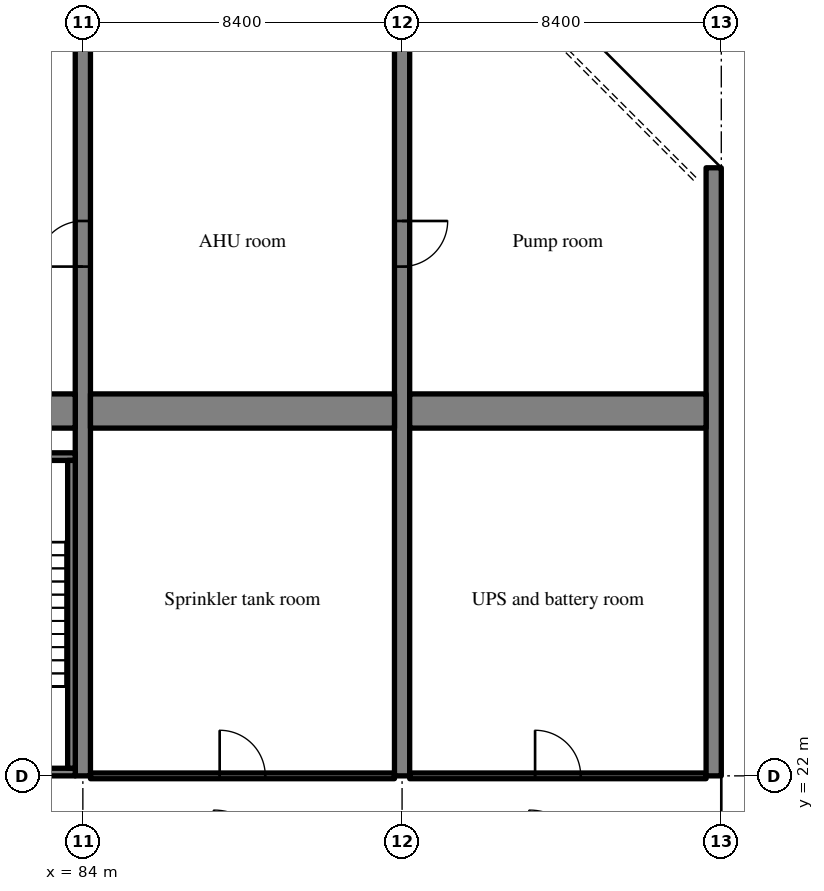
"""IFC4 building model, lengths in metres.
Left out: names, types, materials, properties, quantities, classifications, styles, units other than length and angle.
Written with IfcOpenShell. Run it as: python <this file> out.ifc"""

import sys

from ifc_helpers import new_model, si_unit, direction, frame, frame_2d, origin, place, context, subcontext, project, spatial, rectangle, extrude, source, transform, mapped, element, fill, save


model = new_model("IFC4")
c1 = context("Model", 3, precision=1e-05, world=origin(), true_north=direction((0.0, 1.0)))
c2 = subcontext(c1, "Body", "Model", "MODEL_VIEW")
j1 = project(units=[si_unit("LENGTHUNIT", "METRE"), si_unit("PLANEANGLEUNIT", "RADIAN")], contexts=[c1])
p1 = place(None, origin())
s1 = spatial("IfcSite", under=j1, at=p1, CompositionType="ELEMENT")
p2 = place(p1, origin())
s2 = spatial("IfcBuilding", under=s1, at=p2, CompositionType="ELEMENT")
p3 = place(p2, frame((0.0, 0.0, 81.0)))
s3 = spatial("IfcBuildingStorey", under=s2, at=p3, CompositionType="ELEMENT", Elevation=81.0)
m1 = source(origin(), c2, "Body", "SweptSolid", [
    extrude(rectangle(XDim=20.0, YDim=0.4, at=frame_2d((10.0, 0.0))), origin(), (0.0, 0.0, 1.0), 5.12),
])
p4 = place(p3, frame((84.0, 22.0, 0.0), z_axis=(0.0, 0.0, 1.0), x_axis=(0.0, 1.0, 0.0)))
e1 = element("IfcWall", 1, at=p4, inside=s3, PredefinedType="SHEAR", context=c2, shape_type="MappedRepresentation", body=[
    mapped(m1, transform((0.0, 0.0, 0.0), scale=1.0)),
])
m2 = source(origin(), c2, "Body", "SweptSolid", [
    extrude(rectangle(XDim=1.2, YDim=2.1, at=frame_2d((0.6, 1.05))), frame((0.0, 0.21, 0.0), z_axis=(0.0, -1.0, 0.0), x_axis=(1.0, 0.0, 0.0)), (0.0, 0.0, 1.0), 0.42),
])
p5 = place(p4, frame((13.4, 0.0, 0.0)))
e2 = element("IfcOpeningElement", 2, at=p5, cuts=e1, PredefinedType="OPENING", context=c2, shape_type="MappedRepresentation", body=[
    mapped(m2, transform((0.0, 0.0, 0.0), scale=1.0)),
])
p6 = place(p3, frame((92.4, 22.0, 0.0), z_axis=(0.0, 0.0, 1.0), x_axis=(0.0, 1.0, 0.0)))
e3 = element("IfcWall", 3, at=p6, inside=s3, PredefinedType="SHEAR", context=c2, shape_type="MappedRepresentation", body=[
    mapped(m1, transform((0.0, 0.0, 0.0), scale=1.0)),
])
p7 = place(p6, frame((13.4, 0.0, 0.0)))
e4 = element("IfcOpeningElement", 4, at=p7, cuts=e3, PredefinedType="OPENING", context=c2, shape_type="MappedRepresentation", body=[
    mapped(m2, transform((0.0, 0.0, 0.0), scale=1.0)),
])
m3 = source(origin(), c2, "Body", "SweptSolid", [
    extrude(rectangle(XDim=16.0, YDim=0.4, at=frame_2d((8.0, 0.0))), origin(), (0.0, 0.0, 1.0), 5.12),
])
p8 = place(p3, frame((100.6, 22.0, 0.0), z_axis=(0.0, 0.0, 1.0), x_axis=(0.0, 1.0, 0.0)))
e5 = element("IfcWall", 5, at=p8, inside=s3, PredefinedType="SHEAR", context=c2, shape_type="MappedRepresentation", body=[
    mapped(m3, transform((0.0, 0.0, 0.0), scale=1.0)),
])
m4 = source(origin(), c2, "Body", "SweptSolid", [
    extrude(rectangle(XDim=8.2, YDim=0.9, at=frame_2d((4.1, 0.0))), origin(), (0.0, 0.0, 1.0), 5.12),
])
p9 = place(p3, frame((75.6, 31.6, 0.0), z_axis=(0.0, 0.0, 1.0), x_axis=(1.0, 0.0, 0.0)))
e6 = element("IfcWall", 6, at=p9, inside=s3, PredefinedType="SHEAR", context=c2, shape_type="MappedRepresentation", body=[
    mapped(m4, transform((0.0, 0.0, 0.0), scale=1.0)),
])
m5 = source(origin(), c2, "Body", "SweptSolid", [
    extrude(rectangle(XDim=8.0, YDim=0.9, at=frame_2d((4.0, 0.0))), origin(), (0.0, 0.0, 1.0), 5.12),
])
p10 = place(p3, frame((84.2, 31.6, 0.0), z_axis=(0.0, 0.0, 1.0), x_axis=(1.0, 0.0, 0.0)))
e7 = element("IfcWall", 7, at=p10, inside=s3, PredefinedType="SHEAR", context=c2, shape_type="MappedRepresentation", body=[
    mapped(m5, transform((0.0, 0.0, 0.0), scale=1.0)),
])
m6 = source(origin(), c2, "Body", "SweptSolid", [
    extrude(rectangle(XDim=7.8, YDim=0.9, at=frame_2d((3.9, 0.0))), origin(), (0.0, 0.0, 1.0), 5.12),
])
p11 = place(p3, frame((92.6, 31.6, 0.0), z_axis=(0.0, 0.0, 1.0), x_axis=(1.0, 0.0, 0.0)))
e8 = element("IfcWall", 8, at=p11, inside=s3, PredefinedType="SHEAR", context=c2, shape_type="MappedRepresentation", body=[
    mapped(m6, transform((0.0, 0.0, 0.0), scale=1.0)),
])
m7 = source(origin(), c2, "Body", "SweptSolid", [
    extrude(rectangle(XDim=8.2, YDim=0.2, at=frame_2d((4.1, 0.0))), origin(), (0.0, 0.0, 1.0), 5.12),
])
p12 = place(p3, frame((83.8, 22.1, 0.0), z_axis=(0.0, 0.0, 1.0), x_axis=(-1.0, 0.0, 0.0)))
e9 = element("IfcWall", 9, at=p12, inside=s3, PredefinedType="SOLIDWALL", context=c2, shape_type="MappedRepresentation", body=[
    mapped(m7, transform((0.0, 0.0, 0.0), scale=1.0)),
])
m8 = source(origin(), c2, "Body", "SweptSolid", [
    extrude(rectangle(XDim=1.2, YDim=2.1, at=frame_2d((0.6, 1.05))), frame((0.0, 0.11, 0.0), z_axis=(0.0, -1.0, 0.0), x_axis=(1.0, 0.0, 0.0)), (0.0, 0.0, 1.0), 0.22),
])
p13 = place(p12, frame((6.0, 0.0, 0.0)))
e10 = element("IfcOpeningElement", 10, at=p13, cuts=e9, PredefinedType="OPENING", context=c2, shape_type="MappedRepresentation", body=[
    mapped(m8, transform((0.0, 0.0, 0.0), scale=1.0)),
])
p14 = place(p3, frame((83.8, 30.4, 0.0), z_axis=(0.0, 0.0, 1.0), x_axis=(-1.0, 0.0, 0.0)))
e11 = element("IfcWall", 11, at=p14, inside=s3, PredefinedType="SOLIDWALL", context=c2, shape_type="MappedRepresentation", body=[
    mapped(m7, transform((0.0, 0.0, 0.0), scale=1.0)),
])
m9 = source(origin(), c2, "Body", "SweptSolid", [
    extrude(rectangle(XDim=1.0, YDim=2.1, at=frame_2d((0.5, 1.05))), frame((0.0, 0.11, 0.0), z_axis=(0.0, -1.0, 0.0), x_axis=(1.0, 0.0, 0.0)), (0.0, 0.0, 1.0), 0.22),
])
p15 = place(p14, frame((6.1, 0.0, 0.0)))
e12 = element("IfcOpeningElement", 12, at=p15, cuts=e11, PredefinedType="OPENING", context=c2, shape_type="MappedRepresentation", body=[
    mapped(m9, transform((0.0, 0.0, 0.0), scale=1.0)),
])
m10 = source(origin(), c2, "Body", "SweptSolid", [
    extrude(rectangle(XDim=8.1, YDim=0.2, at=frame_2d((4.05, 0.0))), origin(), (0.0, 0.0, 1.0), 5.12),
])
p16 = place(p3, frame((83.7, 22.2, 0.0), z_axis=(0.0, 0.0, 1.0), x_axis=(0.0, 1.0, 0.0)))
e13 = element("IfcWall", 13, at=p16, inside=s3, PredefinedType="SOLIDWALL", context=c2, shape_type="MappedRepresentation", body=[
    mapped(m10, transform((0.0, 0.0, 0.0), scale=1.0)),
])
m11 = source(origin(), c2, "Body", "SweptSolid", [
    extrude(rectangle(XDim=8.0, YDim=0.15, at=frame_2d((4.0, 0.0))), origin(), (0.0, 0.0, 1.0), 4.37),
])
p17 = place(p3, frame((84.2, 22.0, 0.0), z_axis=(0.0, 0.0, 1.0), x_axis=(1.0, 0.0, 0.0)))
e14 = element("IfcWall", 14, at=p17, inside=s3, PredefinedType="PARTITIONING", context=c2, shape_type="MappedRepresentation", body=[
    mapped(m11, transform((0.0, 0.0, 0.0), scale=1.0)),
])
m12 = source(origin(), c2, "Body", "SweptSolid", [
    extrude(rectangle(XDim=1.2, YDim=2.1, at=frame_2d((0.6, 1.05))), frame((0.0, 0.085, 0.0), z_axis=(0.0, -1.0, 0.0), x_axis=(1.0, 0.0, 0.0)), (0.0, 0.0, 1.0), 0.17),
])
p18 = place(p17, frame((3.4, 0.0, 0.0)))
e15 = element("IfcOpeningElement", 15, at=p18, cuts=e14, PredefinedType="OPENING", context=c2, shape_type="MappedRepresentation", body=[
    mapped(m12, transform((0.0, 0.0, 0.0), scale=1.0)),
])
m13 = source(origin(), c2, "Body", "SweptSolid", [
    extrude(rectangle(XDim=7.8, YDim=0.15, at=frame_2d((3.9, 0.0))), origin(), (0.0, 0.0, 1.0), 4.37),
])
p19 = place(p3, frame((92.6, 22.0, 0.0), z_axis=(0.0, 0.0, 1.0), x_axis=(1.0, 0.0, 0.0)))
e16 = element("IfcWall", 16, at=p19, inside=s3, PredefinedType="PARTITIONING", context=c2, shape_type="MappedRepresentation", body=[
    mapped(m13, transform((0.0, 0.0, 0.0), scale=1.0)),
])
p20 = place(p19, frame((3.3, 0.0, 0.0)))
e17 = element("IfcOpeningElement", 17, at=p20, cuts=e16, PredefinedType="OPENING", context=c2, shape_type="MappedRepresentation", body=[
    mapped(m12, transform((0.0, 0.0, 0.0), scale=1.0)),
])
m14 = source(origin(), c2, "Body", "SweptSolid", [
    extrude(rectangle(XDim=1.2, YDim=2.1, at=frame_2d((0.6, 1.05))), frame((0.0, 0.025, 0.0), z_axis=(0.0, -1.0, 0.0), x_axis=(1.0, 0.0, 0.0)), (0.0, 0.0, 1.0), 0.05),
])
p21 = place(p18, origin())
e18 = element("IfcDoor", 18, at=p21, inside=s3, OperationType="SINGLE_SWING_LEFT", PredefinedType="DOOR", context=c2, shape_type="MappedRepresentation", body=[
    mapped(m14, transform((0.0, 0.0, 0.0), scale=1.0)),
])
fill(e15, e18)
p22 = place(p20, origin())
e19 = element("IfcDoor", 19, at=p22, inside=s3, OperationType="SINGLE_SWING_LEFT", PredefinedType="DOOR", context=c2, shape_type="MappedRepresentation", body=[
    mapped(m14, transform((0.0, 0.0, 0.0), scale=1.0)),
])
fill(e17, e19)
p23 = place(p5, origin())
e20 = element("IfcDoor", 20, at=p23, inside=s3, OperationType="SINGLE_SWING_LEFT", PredefinedType="DOOR", context=c2, shape_type="MappedRepresentation", body=[
    mapped(m14, transform((0.0, 0.0, 0.0), scale=1.0)),
])
fill(e2, e20)
p24 = place(p7, origin())
e21 = element("IfcDoor", 21, at=p24, inside=s3, OperationType="SINGLE_SWING_RIGHT", PredefinedType="DOOR", context=c2, shape_type="MappedRepresentation", body=[
    mapped(m14, transform((0.0, 0.0, 0.0), scale=1.0)),
])
fill(e4, e21)
save(model, sys.argv[1])
